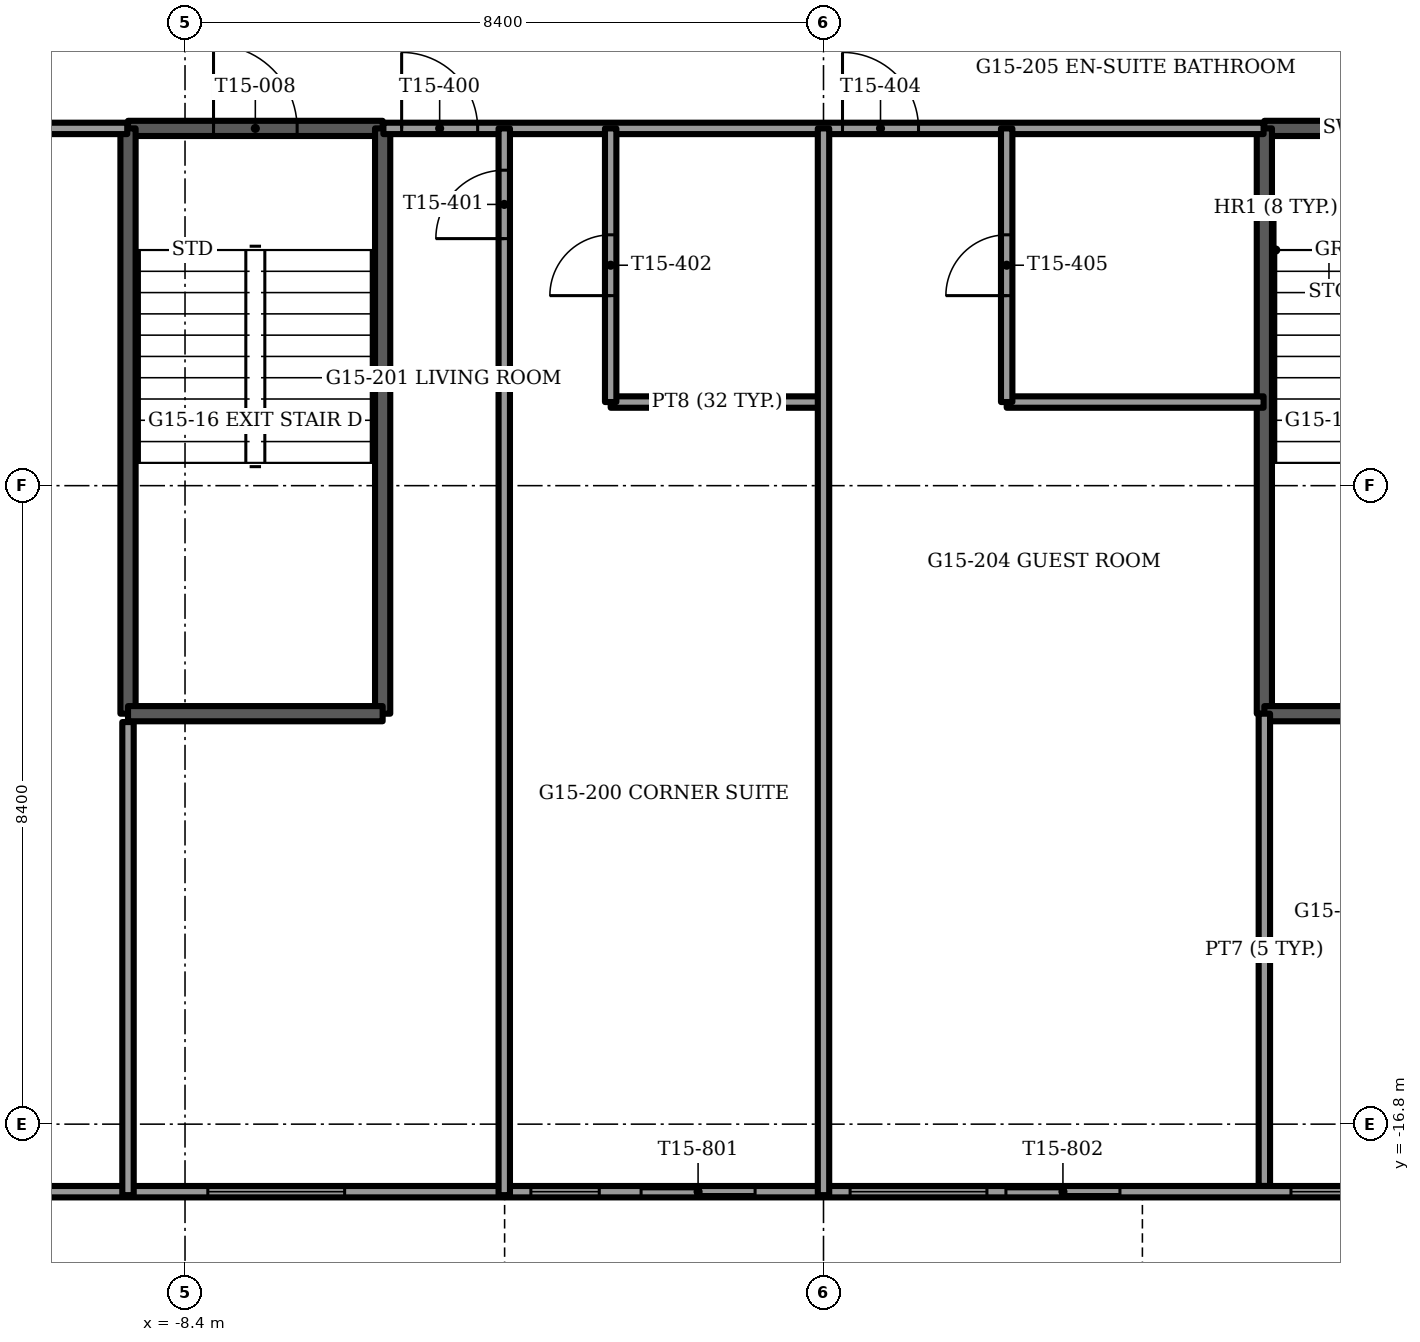
"""IFC4 building model, lengths in metres.
Left out: names, types, materials, properties, quantities, classifications, styles, units other than length and angle.
Written with IfcOpenShell. Run it as: python <this file> out.ifc"""

import sys

from ifc_helpers import new_model, si_unit, direction, frame, frame_2d, origin, place, context, subcontext, project, spatial, rectangle, extrude, element, fill, save


model = new_model("IFC4")
c1 = context("Model", 3, precision=1e-05, world=origin(), true_north=direction((0.0, 1.0)))
c2 = subcontext(c1, "Body", "Model", "MODEL_VIEW")
j1 = project(units=[si_unit("LENGTHUNIT", "METRE"), si_unit("PLANEANGLEUNIT", "RADIAN")], contexts=[c1])
p1 = place(None, origin())
s1 = spatial("IfcSite", under=j1, at=p1, CompositionType="ELEMENT")
p2 = place(p1, origin())
s2 = spatial("IfcBuilding", under=s1, at=p2, CompositionType="ELEMENT")
p3 = place(p2, frame((0.0, 0.0, 61.75)))
s3 = spatial("IfcBuildingStorey", under=s2, at=p3, CompositionType="ELEMENT", Elevation=61.75)
p4 = place(p3, frame((-10.448, -17.689, 0.0), z_axis=(0.0, 0.0, 1.0), x_axis=(1.0, 0.0, 0.0)))
e1 = element("IfcWall", 1, at=p4, inside=s3, PredefinedType="SOLIDWALL", context=c2, shape_type="SweptSolid", body=[
    extrude(rectangle(XDim=20.896, YDim=0.15, at=frame_2d((10.448, 0.0))), origin(), (0.0, 0.0, 1.0), 3.45),
])
p5 = place(p4, frame((2.348, 0.0, 0.15)))
e2 = element("IfcOpeningElement", 2, at=p5, cuts=e1, PredefinedType="OPENING", context=c2, shape_type="SweptSolid", body=[
    extrude(rectangle(XDim=1.8, YDim=2.85, at=frame_2d((0.9, 1.425))), frame((0.0, 0.075, 0.0), z_axis=(0.0, -1.0, 0.0), x_axis=(1.0, 0.0, 0.0)), (0.0, 0.0, 1.0), 0.15),
])
p6 = place(p4, frame((6.598, 0.0, 0.15)))
e3 = element("IfcOpeningElement", 3, at=p6, cuts=e1, PredefinedType="OPENING", context=c2, shape_type="SweptSolid", body=[
    extrude(rectangle(XDim=0.9, YDim=2.85, at=frame_2d((0.45, 1.425))), frame((0.0, 0.075, 0.0), z_axis=(0.0, -1.0, 0.0), x_axis=(1.0, 0.0, 0.0)), (0.0, 0.0, 1.0), 0.15),
])
p7 = place(p4, frame((8.048, 0.0, 0.0)))
e4 = element("IfcOpeningElement", 4, at=p7, cuts=e1, PredefinedType="OPENING", context=c2, shape_type="SweptSolid", body=[
    extrude(rectangle(XDim=1.5, YDim=2.4, at=frame_2d((0.75, 1.2))), frame((0.0, 0.075, 0.0), z_axis=(0.0, -1.0, 0.0), x_axis=(1.0, 0.0, 0.0)), (0.0, 0.0, 1.0), 0.15),
])
p8 = place(p4, frame((10.798, 0.0, 0.15)))
e5 = element("IfcOpeningElement", 5, at=p8, cuts=e1, PredefinedType="OPENING", context=c2, shape_type="SweptSolid", body=[
    extrude(rectangle(XDim=1.8, YDim=2.85, at=frame_2d((0.9, 1.425))), frame((0.0, 0.075, 0.0), z_axis=(0.0, -1.0, 0.0), x_axis=(1.0, 0.0, 0.0)), (0.0, 0.0, 1.0), 0.15),
])
p9 = place(p4, frame((12.848, 0.0, 0.0)))
e6 = element("IfcOpeningElement", 6, at=p9, cuts=e1, PredefinedType="OPENING", context=c2, shape_type="SweptSolid", body=[
    extrude(rectangle(XDim=1.5, YDim=2.4, at=frame_2d((0.75, 1.2))), frame((0.0, 0.075, 0.0), z_axis=(0.0, -1.0, 0.0), x_axis=(1.0, 0.0, 0.0)), (0.0, 0.0, 1.0), 0.15),
])
p10 = place(p4, frame((16.598, 0.0, 0.15)))
e7 = element("IfcOpeningElement", 7, at=p10, cuts=e1, PredefinedType="OPENING", context=c2, shape_type="SweptSolid", body=[
    extrude(rectangle(XDim=1.8, YDim=2.85, at=frame_2d((0.9, 1.425))), frame((0.0, 0.075, 0.0), z_axis=(0.0, -1.0, 0.0), x_axis=(1.0, 0.0, 0.0)), (0.0, 0.0, 1.0), 0.15),
])
p11 = place(p3, frame((5.8, -3.7, -0.3), z_axis=(0.0, 0.0, 1.0), x_axis=(1.0, 0.0, 0.0)))
e8 = element("IfcWall", 8, at=p11, inside=s3, PredefinedType="SOLIDWALL", context=c2, shape_type="SweptSolid", body=[
    extrude(rectangle(XDim=3.35, YDim=0.2, at=frame_2d((1.675, 0.0))), origin(), (0.0, 0.0, 1.0), 3.75),
])
p12 = place(p11, frame((1.125, 0.0, 0.0)))
e9 = element("IfcOpeningElement", 9, at=p12, cuts=e8, PredefinedType="OPENING", context=c2, shape_type="SweptSolid", body=[
    extrude(rectangle(XDim=1.1, YDim=2.1, at=frame_2d((0.55, 1.05))), frame((0.0, 0.1, 0.0), z_axis=(0.0, -1.0, 0.0), x_axis=(1.0, 0.0, 0.0)), (0.0, 0.0, 1.0), 0.2),
])
p13 = place(p3, frame((5.8, -3.7, -0.3), z_axis=(0.0, 0.0, 1.0), x_axis=(0.0, -1.0, 0.0)))
e10 = element("IfcWall", 10, at=p13, inside=s3, PredefinedType="SOLIDWALL", context=c2, shape_type="SweptSolid", body=[
    extrude(rectangle(XDim=7.7, YDim=0.2, at=frame_2d((3.85, 0.0))), origin(), (0.0, 0.0, 1.0), 3.75),
])
p14 = place(p3, frame((5.8, -11.4, -0.3), z_axis=(0.0, 0.0, 1.0), x_axis=(1.0, 0.0, 0.0)))
e11 = element("IfcWall", 11, at=p14, inside=s3, PredefinedType="SOLIDWALL", context=c2, shape_type="SweptSolid", body=[
    extrude(rectangle(XDim=3.35, YDim=0.2, at=frame_2d((1.675, 0.0))), origin(), (0.0, 0.0, 1.0), 3.75),
])
p15 = place(p3, frame((5.8, -11.4, 0.0), z_axis=(0.0, 0.0, 1.0), x_axis=(0.0, -1.0, 0.0)))
e12 = element("IfcWall", 12, at=p15, inside=s3, PredefinedType="PARTITIONING", context=c2, shape_type="SweptSolid", body=[
    extrude(rectangle(XDim=6.214, YDim=0.15, at=frame_2d((3.107, 0.0))), origin(), (0.0, 0.0, 1.0), 3.45),
])
p16 = place(p3, frame((-9.15, -3.7, -0.3), z_axis=(0.0, 0.0, 1.0), x_axis=(1.0, 0.0, 0.0)))
e13 = element("IfcWall", 13, at=p16, inside=s3, PredefinedType="SOLIDWALL", context=c2, shape_type="SweptSolid", body=[
    extrude(rectangle(XDim=3.35, YDim=0.2, at=frame_2d((1.675, 0.0))), origin(), (0.0, 0.0, 1.0), 3.75),
])
p17 = place(p16, frame((1.125, 0.0, 0.0)))
e14 = element("IfcOpeningElement", 14, at=p17, cuts=e13, PredefinedType="OPENING", context=c2, shape_type="SweptSolid", body=[
    extrude(rectangle(XDim=1.1, YDim=2.1, at=frame_2d((0.55, 1.05))), frame((0.0, 0.1, 0.0), z_axis=(0.0, -1.0, 0.0), x_axis=(1.0, 0.0, 0.0)), (0.0, 0.0, 1.0), 0.2),
])
for number, where, z_axis, x_axis in (
    (15, (-9.15, -3.7, -0.3), (0.0, 0.0, 1.0), (0.0, -1.0, 0.0)),
    (16, (-5.8, -3.7, -0.3), (0.0, 0.0, 1.0), (0.0, -1.0, 0.0)),
):
    element("IfcWall", number, at=place(p3, frame(where, z_axis=z_axis, x_axis=x_axis)), inside=s3, PredefinedType="SOLIDWALL", context=c2, shape_type="SweptSolid", body=[
        extrude(rectangle(XDim=7.7, YDim=0.2, at=frame_2d((3.85, 0.0))), origin(), (0.0, 0.0, 1.0), 3.75),
    ])
p18 = place(p3, frame((-9.15, -11.4, -0.3), z_axis=(0.0, 0.0, 1.0), x_axis=(1.0, 0.0, 0.0)))
e17 = element("IfcWall", 17, at=p18, inside=s3, PredefinedType="SOLIDWALL", context=c2, shape_type="SweptSolid", body=[
    extrude(rectangle(XDim=3.35, YDim=0.2, at=frame_2d((1.675, 0.0))), origin(), (0.0, 0.0, 1.0), 3.75),
])
p19 = place(p3, frame((-2.8, -7.3, 0.0), z_axis=(0.0, 0.0, 1.0), x_axis=(1.0, 0.0, 0.0)))
e18 = element("IfcWall", 18, at=p19, inside=s3, PredefinedType="PARTITIONING", context=c2, shape_type="SweptSolid", body=[
    extrude(rectangle(XDim=2.8, YDim=0.15, at=frame_2d((1.4, 0.0))), origin(), (0.0, 0.0, 1.0), 3.45),
])
p20 = place(p3, frame((2.41, -7.3, 0.0), z_axis=(0.0, 0.0, 1.0), x_axis=(1.0, 0.0, 0.0)))
e19 = element("IfcWall", 19, at=p20, inside=s3, PredefinedType="PARTITIONING", context=c2, shape_type="SweptSolid", body=[
    extrude(rectangle(XDim=3.38, YDim=0.15, at=frame_2d((1.69, 0.0))), origin(), (0.0, 0.0, 1.0), 3.45),
])
p21 = place(p3, frame((-19.191, -3.7, 0.0), z_axis=(0.0, 0.0, 1.0), x_axis=(1.0, 0.0, 0.0)))
e20 = element("IfcWall", 20, at=p21, inside=s3, PredefinedType="PARTITIONING", context=c2, shape_type="SweptSolid", body=[
    extrude(rectangle(XDim=10.031, YDim=0.15, at=frame_2d((5.016, 0.0))), origin(), (0.0, 0.0, 1.0), 3.45),
])
p22 = place(p21, frame((7.191, 0.0, 0.0)))
e21 = element("IfcOpeningElement", 21, at=p22, cuts=e20, PredefinedType="OPENING", context=c2, shape_type="SweptSolid", body=[
    extrude(rectangle(XDim=1.0, YDim=2.1, at=frame_2d((0.5, 1.05))), frame((0.0, 0.075, 0.0), z_axis=(0.0, -1.0, 0.0), x_axis=(1.0, 0.0, 0.0)), (0.0, 0.0, 1.0), 0.15),
])
p23 = place(p3, frame((-5.79, -3.7, 0.0), z_axis=(0.0, 0.0, 1.0), x_axis=(1.0, 0.0, 0.0)))
e22 = element("IfcWall", 22, at=p23, inside=s3, PredefinedType="PARTITIONING", context=c2, shape_type="SweptSolid", body=[
    extrude(rectangle(XDim=11.58, YDim=0.15, at=frame_2d((5.79, 0.0))), origin(), (0.0, 0.0, 1.0), 3.45),
])
p24 = place(p23, frame((0.24, 0.0, 0.0)))
e23 = element("IfcOpeningElement", 23, at=p24, cuts=e22, PredefinedType="OPENING", context=c2, shape_type="SweptSolid", body=[
    extrude(rectangle(XDim=1.0, YDim=2.1, at=frame_2d((0.5, 1.05))), frame((0.0, 0.075, 0.0), z_axis=(0.0, -1.0, 0.0), x_axis=(1.0, 0.0, 0.0)), (0.0, 0.0, 1.0), 0.15),
])
p25 = place(p23, frame((6.04, 0.0, 0.0)))
e24 = element("IfcOpeningElement", 24, at=p25, cuts=e22, PredefinedType="OPENING", context=c2, shape_type="SweptSolid", body=[
    extrude(rectangle(XDim=1.0, YDim=2.1, at=frame_2d((0.5, 1.05))), frame((0.0, 0.075, 0.0), z_axis=(0.0, -1.0, 0.0), x_axis=(1.0, 0.0, 0.0)), (0.0, 0.0, 1.0), 0.15),
])
p26 = place(p3, frame((2.41, -7.3, 0.0), z_axis=(0.0, 0.0, 1.0), x_axis=(0.0, 1.0, 0.0)))
e25 = element("IfcWall", 25, at=p26, inside=s3, PredefinedType="PARTITIONING", context=c2, shape_type="SweptSolid", body=[
    extrude(rectangle(XDim=3.6, YDim=0.15, at=frame_2d((1.8, 0.0))), origin(), (0.0, 0.0, 1.0), 3.45),
])
p27 = place(p26, frame((1.4, 0.0, 0.0)))
e26 = element("IfcOpeningElement", 26, at=p27, cuts=e25, PredefinedType="OPENING", context=c2, shape_type="SweptSolid", body=[
    extrude(rectangle(XDim=0.8, YDim=2.1, at=frame_2d((0.4, 1.05))), frame((0.0, 0.075, 0.0), z_axis=(0.0, -1.0, 0.0), x_axis=(1.0, 0.0, 0.0)), (0.0, 0.0, 1.0), 0.15),
])
p28 = place(p3, frame((0.0, -17.734, 0.0), z_axis=(0.0, 0.0, 1.0), x_axis=(0.0, 1.0, 0.0)))
e27 = element("IfcWall", 27, at=p28, inside=s3, PredefinedType="PARTITIONING", context=c2, shape_type="SweptSolid", body=[
    extrude(rectangle(XDim=14.034, YDim=0.15, at=frame_2d((7.017, 0.0))), origin(), (0.0, 0.0, 1.0), 3.45),
])
p29 = place(p3, frame((-2.8, -7.3, 0.0), z_axis=(0.0, 0.0, 1.0), x_axis=(0.0, 1.0, 0.0)))
e28 = element("IfcWall", 28, at=p29, inside=s3, PredefinedType="PARTITIONING", context=c2, shape_type="SweptSolid", body=[
    extrude(rectangle(XDim=3.6, YDim=0.15, at=frame_2d((1.8, 0.0))), origin(), (0.0, 0.0, 1.0), 3.45),
])
p30 = place(p29, frame((1.4, 0.0, 0.0)))
e29 = element("IfcOpeningElement", 29, at=p30, cuts=e28, PredefinedType="OPENING", context=c2, shape_type="SweptSolid", body=[
    extrude(rectangle(XDim=0.8, YDim=2.1, at=frame_2d((0.4, 1.05))), frame((0.0, 0.075, 0.0), z_axis=(0.0, -1.0, 0.0), x_axis=(1.0, 0.0, 0.0)), (0.0, 0.0, 1.0), 0.15),
])
p31 = place(p3, frame((-4.2, -17.734, 0.0), z_axis=(0.0, 0.0, 1.0), x_axis=(0.0, 1.0, 0.0)))
e30 = element("IfcWall", 30, at=p31, inside=s3, PredefinedType="PARTITIONING", context=c2, shape_type="SweptSolid", body=[
    extrude(rectangle(XDim=14.034, YDim=0.15, at=frame_2d((7.017, 0.0))), origin(), (0.0, 0.0, 1.0), 3.45),
])
p32 = place(p31, frame((12.584, 0.0, 0.0)))
e31 = element("IfcOpeningElement", 31, at=p32, cuts=e30, PredefinedType="OPENING", context=c2, shape_type="SweptSolid", body=[
    extrude(rectangle(XDim=0.9, YDim=2.1, at=frame_2d((0.45, 1.05))), frame((0.0, 0.075, 0.0), z_axis=(0.0, -1.0, 0.0), x_axis=(1.0, 0.0, 0.0)), (0.0, 0.0, 1.0), 0.15),
])
p33 = place(p3, frame((-9.15, -17.734, 0.0), z_axis=(0.0, 0.0, 1.0), x_axis=(0.0, 1.0, 0.0)))
e32 = element("IfcWall", 32, at=p33, inside=s3, PredefinedType="PARTITIONING", context=c2, shape_type="SweptSolid", body=[
    extrude(rectangle(XDim=6.224, YDim=0.15, at=frame_2d((3.112, 0.0))), origin(), (0.0, 0.0, 1.0), 3.45),
])
p34 = place(p5, origin())
e33 = element("IfcWindow", 33, at=p34, inside=s3, PartitioningType="SINGLE_PANEL", PredefinedType="WINDOW", context=c2, shape_type="SweptSolid", body=[
    extrude(rectangle(XDim=1.8, YDim=2.85, at=frame_2d((0.9, 1.425))), frame((0.0, 0.03, 0.0), z_axis=(0.0, -1.0, 0.0), x_axis=(1.0, 0.0, 0.0)), (0.0, 0.0, 1.0), 0.06),
])
fill(e2, e33)
p35 = place(p6, origin())
e34 = element("IfcWindow", 34, at=p35, inside=s3, PartitioningType="SINGLE_PANEL", PredefinedType="WINDOW", context=c2, shape_type="SweptSolid", body=[
    extrude(rectangle(XDim=0.9, YDim=2.85, at=frame_2d((0.45, 1.425))), frame((0.0, 0.03, 0.0), z_axis=(0.0, -1.0, 0.0), x_axis=(1.0, 0.0, 0.0)), (0.0, 0.0, 1.0), 0.06),
])
fill(e3, e34)
p36 = place(p7, origin())
e35 = element("IfcDoor", 35, at=p36, inside=s3, OperationType="SLIDING_TO_RIGHT", PredefinedType="DOOR", context=c2, shape_type="SweptSolid", body=[
    extrude(rectangle(XDim=1.5, YDim=2.4, at=frame_2d((0.75, 1.2))), frame((0.0, 0.025, 0.0), z_axis=(0.0, -1.0, 0.0), x_axis=(1.0, 0.0, 0.0)), (0.0, 0.0, 1.0), 0.05),
])
fill(e4, e35)
p37 = place(p8, origin())
e36 = element("IfcWindow", 36, at=p37, inside=s3, PartitioningType="SINGLE_PANEL", PredefinedType="WINDOW", context=c2, shape_type="SweptSolid", body=[
    extrude(rectangle(XDim=1.8, YDim=2.85, at=frame_2d((0.9, 1.425))), frame((0.0, 0.03, 0.0), z_axis=(0.0, -1.0, 0.0), x_axis=(1.0, 0.0, 0.0)), (0.0, 0.0, 1.0), 0.06),
])
fill(e5, e36)
p38 = place(p9, origin())
e37 = element("IfcDoor", 37, at=p38, inside=s3, OperationType="SLIDING_TO_LEFT", PredefinedType="DOOR", context=c2, shape_type="SweptSolid", body=[
    extrude(rectangle(XDim=1.5, YDim=2.4, at=frame_2d((0.75, 1.2))), frame((0.0, 0.025, 0.0), z_axis=(0.0, -1.0, 0.0), x_axis=(1.0, 0.0, 0.0)), (0.0, 0.0, 1.0), 0.05),
])
fill(e6, e37)
p39 = place(p10, origin())
e38 = element("IfcWindow", 38, at=p39, inside=s3, PartitioningType="SINGLE_PANEL", PredefinedType="WINDOW", context=c2, shape_type="SweptSolid", body=[
    extrude(rectangle(XDim=1.8, YDim=2.85, at=frame_2d((0.9, 1.425))), frame((0.0, 0.03, 0.0), z_axis=(0.0, -1.0, 0.0), x_axis=(1.0, 0.0, 0.0)), (0.0, 0.0, 1.0), 0.06),
])
fill(e7, e38)
p40 = place(p17, origin())
e39 = element("IfcDoor", 39, at=p40, inside=s3, OperationType="SINGLE_SWING_LEFT", PredefinedType="DOOR", context=c2, shape_type="SweptSolid", body=[
    extrude(rectangle(XDim=1.1, YDim=2.1, at=frame_2d((0.55, 1.05))), frame((0.0, 0.025, 0.0), z_axis=(0.0, -1.0, 0.0), x_axis=(1.0, 0.0, 0.0)), (0.0, 0.0, 1.0), 0.05),
])
fill(e14, e39)
p41 = place(p24, origin())
e40 = element("IfcDoor", 40, at=p41, inside=s3, OperationType="SINGLE_SWING_LEFT", PredefinedType="DOOR", context=c2, shape_type="SweptSolid", body=[
    extrude(rectangle(XDim=1.0, YDim=2.1, at=frame_2d((0.5, 1.05))), frame((0.0, 0.025, 0.0), z_axis=(0.0, -1.0, 0.0), x_axis=(1.0, 0.0, 0.0)), (0.0, 0.0, 1.0), 0.05),
])
fill(e23, e40)
p42 = place(p32, origin())
e41 = element("IfcDoor", 41, at=p42, inside=s3, OperationType="SINGLE_SWING_RIGHT", PredefinedType="DOOR", context=c2, shape_type="SweptSolid", body=[
    extrude(rectangle(XDim=0.9, YDim=2.1, at=frame_2d((0.45, 1.05))), frame((0.0, 0.025, 0.0), z_axis=(0.0, -1.0, 0.0), x_axis=(1.0, 0.0, 0.0)), (0.0, 0.0, 1.0), 0.05),
])
fill(e31, e41)
p43 = place(p30, origin())
e42 = element("IfcDoor", 42, at=p43, inside=s3, OperationType="SINGLE_SWING_RIGHT", PredefinedType="DOOR", context=c2, shape_type="SweptSolid", body=[
    extrude(rectangle(XDim=0.8, YDim=2.1, at=frame_2d((0.4, 1.05))), frame((0.0, 0.025, 0.0), z_axis=(0.0, -1.0, 0.0), x_axis=(1.0, 0.0, 0.0)), (0.0, 0.0, 1.0), 0.05),
])
fill(e29, e42)
p44 = place(p25, origin())
e43 = element("IfcDoor", 43, at=p44, inside=s3, OperationType="SINGLE_SWING_LEFT", PredefinedType="DOOR", context=c2, shape_type="SweptSolid", body=[
    extrude(rectangle(XDim=1.0, YDim=2.1, at=frame_2d((0.5, 1.05))), frame((0.0, 0.025, 0.0), z_axis=(0.0, -1.0, 0.0), x_axis=(1.0, 0.0, 0.0)), (0.0, 0.0, 1.0), 0.05),
])
fill(e24, e43)
p45 = place(p27, origin())
e44 = element("IfcDoor", 44, at=p45, inside=s3, OperationType="SINGLE_SWING_RIGHT", PredefinedType="DOOR", context=c2, shape_type="SweptSolid", body=[
    extrude(rectangle(XDim=0.8, YDim=2.1, at=frame_2d((0.4, 1.05))), frame((0.0, 0.025, 0.0), z_axis=(0.0, -1.0, 0.0), x_axis=(1.0, 0.0, 0.0)), (0.0, 0.0, 1.0), 0.05),
])
fill(e26, e44)
save(model, sys.argv[1])
